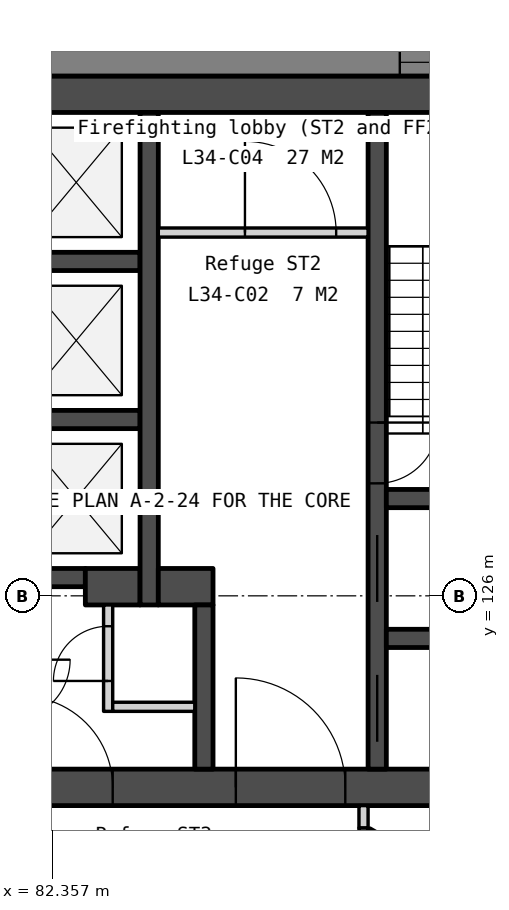
"""IFC4 building model, lengths in metres.
Left out: names, types, materials, properties, quantities, classifications, styles, units other than length and angle.
Written with IfcOpenShell. Run it as: python <this file> out.ifc"""

import sys

from ifc_helpers import new_model, si_unit, direction, frame, frame_2d, origin, place, context, subcontext, project, spatial, polyline, rectangle, outline, extrude, element, fill, save


model = new_model("IFC4")
c1 = context("Model", 3, precision=1e-05, world=origin(), true_north=direction((0.0, 1.0)))
c2 = subcontext(c1, "Body", "Model", "MODEL_VIEW")
j1 = project(units=[si_unit("LENGTHUNIT", "METRE"), si_unit("PLANEANGLEUNIT", "RADIAN")], contexts=[c1])
p1 = place(None, origin())
s1 = spatial("IfcSite", under=j1, at=p1, CompositionType="ELEMENT")
p2 = place(p1, origin())
s2 = spatial("IfcBuilding", under=s1, at=p2, CompositionType="ELEMENT")
p3 = place(p2, frame((0.0, 0.0, 136.4)))
s3 = spatial("IfcBuildingStorey", under=s2, at=p3, CompositionType="ELEMENT", Elevation=136.4)
p4 = place(p3, frame((69.0, 134.25, 0.0), z_axis=(0.0, 0.0, 1.0), x_axis=(1.0, 0.0, 0.0)))
e1 = element("IfcWall", 1, at=p4, inside=s3, PredefinedType="SOLIDWALL", context=c2, shape_type="SweptSolid", body=[
    extrude(rectangle(XDim=22.0, YDim=0.6, at=frame_2d((11.0, 0.0))), origin(), (0.0, 0.0, 1.0), 3.75),
])
p5 = place(p3, frame((69.0, 122.85, 0.0), z_axis=(0.0, 0.0, 1.0), x_axis=(1.0, 0.0, 0.0)))
e2 = element("IfcWall", 2, at=p5, inside=s3, PredefinedType="SOLIDWALL", context=c2, shape_type="SweptSolid", body=[
    extrude(rectangle(XDim=22.0, YDim=0.6, at=frame_2d((11.0, 0.0))), origin(), (0.0, 0.0, 1.0), 3.75),
])
p6 = place(p5, frame((16.375, 0.0, 0.0)))
e3 = element("IfcOpeningElement", 3, at=p6, cuts=e2, PredefinedType="OPENING", context=c2, shape_type="SweptSolid", body=[
    extrude(rectangle(XDim=1.8, YDim=2.1, at=frame_2d((0.9, 1.05))), frame((0.0, 0.31, 0.0), z_axis=(0.0, -1.0, 0.0), x_axis=(1.0, 0.0, 0.0)), (0.0, 0.0, 1.0), 0.62),
])
p7 = place(p5, frame((3.825, 0.0, 0.0)))
e4 = element("IfcOpeningElement", 4, at=p7, cuts=e2, PredefinedType="OPENING", context=c2, shape_type="SweptSolid", body=[
    extrude(rectangle(XDim=1.8, YDim=2.1, at=frame_2d((0.9, 1.05))), frame((0.0, 0.31, 0.0), z_axis=(0.0, -1.0, 0.0), x_axis=(1.0, 0.0, 0.0)), (0.0, 0.0, 1.0), 0.62),
])
p8 = place(p5, frame((12.85, 0.0, 0.0)))
e5 = element("IfcOpeningElement", 5, at=p8, cuts=e2, PredefinedType="OPENING", context=c2, shape_type="SweptSolid", body=[
    extrude(rectangle(XDim=1.5, YDim=2.1, at=frame_2d((0.75, 1.05))), frame((0.0, 0.31, 0.0), z_axis=(0.0, -1.0, 0.0), x_axis=(1.0, 0.0, 0.0)), (0.0, 0.0, 1.0), 0.62),
])
for number, where, z_axis, x_axis in (
    (6, (81.7, 131.5, 0.0), (0.0, 0.0, 1.0), (1.0, 0.0, 0.0)),
    (7, (81.7, 128.9, 0.0), (0.0, 0.0, 1.0), (1.0, 0.0, 0.0)),
):
    element("IfcWall", number, at=place(p3, frame(where, z_axis=z_axis, x_axis=x_axis)), inside=s3, PredefinedType="SOLIDWALL", context=c2, shape_type="SweptSolid", body=[
        extrude(rectangle(XDim=2.1, YDim=0.3, at=frame_2d((1.05, 0.0))), origin(), (0.0, 0.0, 1.0), 3.75),
    ])
p9 = place(p3, frame((81.7, 126.3, 0.0), z_axis=(0.0, 0.0, 1.0), x_axis=(1.0, 0.0, 0.0)))
e8 = element("IfcWall", 8, at=p9, inside=s3, PredefinedType="SOLIDWALL", context=c2, shape_type="SweptSolid", body=[
    extrude(rectangle(XDim=1.2, YDim=0.3, at=frame_2d((0.6, 0.0))), origin(), (0.0, 0.0, 1.0), 3.75),
])
p10 = place(p3, frame((82.9, 126.15, 0.0), z_axis=(0.0, 0.0, 1.0), x_axis=(1.0, 0.0, 0.0)))
e9 = element("IfcWall", 9, at=p10, inside=s3, PredefinedType="SOLIDWALL", context=c2, shape_type="SweptSolid", body=[
    extrude(rectangle(XDim=0.9, YDim=0.6, at=frame_2d((0.45, 0.0))), origin(), (0.0, 0.0, 1.0), 3.75),
])
p11 = place(p3, frame((83.275, 125.85, 0.0), z_axis=(0.0, 0.0, 1.0), x_axis=(0.0, -1.0, 0.0)))
e10 = element("IfcWall", 10, at=p11, inside=s3, PredefinedType="PARTITIONING", context=c2, shape_type="SweptSolid", body=[
    extrude(rectangle(XDim=1.75, YDim=0.15, at=frame_2d((0.875, 0.0))), origin(), (0.0, 0.0, 1.0), 3.75),
])
p12 = place(p11, frame((0.35, 0.0, 0.0)))
e11 = element("IfcOpeningElement", 11, at=p12, cuts=e10, PredefinedType="OPENING", context=c2, shape_type="SweptSolid", body=[
    extrude(rectangle(XDim=0.9, YDim=2.1, at=frame_2d((0.45, 1.05))), frame((0.0, 0.085, 0.0), z_axis=(0.0, -1.0, 0.0), x_axis=(1.0, 0.0, 0.0)), (0.0, 0.0, 1.0), 0.17),
])
p13 = place(p3, frame((83.35, 124.175, 0.0), z_axis=(0.0, 0.0, 1.0), x_axis=(1.0, 0.0, 0.0)))
e12 = element("IfcWall", 12, at=p13, inside=s3, PredefinedType="PARTITIONING", context=c2, shape_type="SweptSolid", body=[
    extrude(rectangle(XDim=1.35, YDim=0.15, at=frame_2d((0.675, 0.0))), origin(), (0.0, 0.0, 1.0), 3.75),
])
p14 = place(p3, frame((83.95, 133.95, 0.0), z_axis=(0.0, 0.0, 1.0), x_axis=(0.0, -1.0, 0.0)))
e13 = element("IfcWall", 13, at=p14, inside=s3, PredefinedType="SOLIDWALL", context=c2, shape_type="SweptSolid", body=[
    extrude(rectangle(XDim=8.1, YDim=0.3, at=frame_2d((4.05, 0.0))), origin(), (0.0, 0.0, 1.0), 3.75),
])
p15 = place(p3, frame((84.1, 131.975, 0.0), z_axis=(0.0, 0.0, 1.0), x_axis=(1.0, 0.0, 0.0)))
e14 = element("IfcWall", 14, at=p15, inside=s3, PredefinedType="PARTITIONING", context=c2, shape_type="SweptSolid", body=[
    extrude(rectangle(XDim=3.45, YDim=0.15, at=frame_2d((1.725, 0.0))), origin(), (0.0, 0.0, 1.0), 3.75),
])
p16 = place(p15, frame((1.425, 0.0, 0.0)))
e15 = element("IfcOpeningElement", 15, at=p16, cuts=e14, PredefinedType="OPENING", context=c2, shape_type="SweptSolid", body=[
    extrude(rectangle(XDim=1.5, YDim=2.1, at=frame_2d((0.75, 1.05))), frame((0.0, 0.085, 0.0), z_axis=(0.0, -1.0, 0.0), x_axis=(1.0, 0.0, 0.0)), (0.0, 0.0, 1.0), 0.17),
])
p17 = place(p3, frame((84.1, 126.15, 0.0), z_axis=(0.0, 0.0, 1.0), x_axis=(1.0, 0.0, 0.0)))
e16 = element("IfcWall", 16, at=p17, inside=s3, PredefinedType="SOLIDWALL", context=c2, shape_type="SweptSolid", body=[
    extrude(rectangle(XDim=0.9, YDim=0.6, at=frame_2d((0.45, 0.0))), origin(), (0.0, 0.0, 1.0), 3.75),
])
p18 = place(p3, frame((84.85, 125.85, 0.0), z_axis=(0.0, 0.0, 1.0), x_axis=(0.0, -1.0, 0.0)))
e17 = element("IfcWall", 17, at=p18, inside=s3, PredefinedType="SOLIDWALL", context=c2, shape_type="SweptSolid", body=[
    extrude(rectangle(XDim=2.7, YDim=0.3, at=frame_2d((1.35, 0.0))), origin(), (0.0, 0.0, 1.0), 3.75),
])
p19 = place(p3, frame((87.7, 133.95, 0.0), z_axis=(0.0, 0.0, 1.0), x_axis=(0.0, -1.0, 0.0)))
e18 = element("IfcWall", 18, at=p19, inside=s3, PredefinedType="SOLIDWALL", context=c2, shape_type="SweptSolid", body=[
    extrude(rectangle(XDim=10.8, YDim=0.3, at=frame_2d((5.4, 0.0))), origin(), (0.0, 0.0, 1.0), 3.75),
])
p20 = place(p19, frame((6.95, 0.0, 0.0)))
e19 = element("IfcOpeningElement", 19, at=p20, cuts=e18, PredefinedType="OPENING", context=c2, shape_type="SweptSolid", body=[
    extrude(rectangle(XDim=1.1, YDim=2.1, at=frame_2d((0.55, 1.05))), frame((0.0, 0.16, 0.0), z_axis=(0.0, -1.0, 0.0), x_axis=(1.0, 0.0, 0.0)), (0.0, 0.0, 1.0), 0.32),
])
p21 = place(p19, frame((5.1, 0.0, 0.0)))
e20 = element("IfcOpeningElement", 20, at=p21, cuts=e18, PredefinedType="OPENING", context=c2, shape_type="SweptSolid", body=[
    extrude(rectangle(XDim=1.0, YDim=2.1, at=frame_2d((0.5, 1.05))), frame((0.0, 0.16, 0.0), z_axis=(0.0, -1.0, 0.0), x_axis=(1.0, 0.0, 0.0)), (0.0, 0.0, 1.0), 0.32),
])
p22 = place(p19, frame((9.25, 0.0, 0.0)))
e21 = element("IfcOpeningElement", 21, at=p22, cuts=e18, PredefinedType="OPENING", context=c2, shape_type="SweptSolid", body=[
    extrude(rectangle(XDim=1.1, YDim=2.1, at=frame_2d((0.55, 1.05))), frame((0.0, 0.16, 0.0), z_axis=(0.0, -1.0, 0.0), x_axis=(1.0, 0.0, 0.0)), (0.0, 0.0, 1.0), 0.32),
])
for number, where, z_axis, x_axis in (
    (22, (87.85, 127.6, 0.0), (0.0, 0.0, 1.0), (1.0, 0.0, 0.0)),
    (23, (87.85, 125.3, 0.0), (0.0, 0.0, 1.0), (1.0, 0.0, 0.0)),
):
    element("IfcWall", number, at=place(p3, frame(where, z_axis=z_axis, x_axis=x_axis)), inside=s3, PredefinedType="SOLIDWALL", context=c2, shape_type="SweptSolid", body=[
        extrude(rectangle(XDim=2.55, YDim=0.3, at=frame_2d((1.275, 0.0))), origin(), (0.0, 0.0, 1.0), 3.75),
    ])
p23 = place(p3, frame((100.243, 134.775, -0.15), z_axis=(0.0, 0.0, 1.0), x_axis=(-1.0, 0.0, 0.0)))
e24 = element("IfcWall", 24, at=p23, inside=s3, PredefinedType="SOLIDWALL", context=c2, shape_type="SweptSolid", body=[
    extrude(outline(polyline([(40.486, 0.0), (40.486, 3.9), (0.0, 3.9), (0.0, 0.0), (40.486, 0.0)])), frame((0.0, 0.225, 0.0), z_axis=(0.0, -1.0, 0.0), x_axis=(1.0, 0.0, 0.0)), (0.0, 0.0, 1.0), 0.45),
])
p24 = place(p23, frame((0.87, 0.0, 0.95)))
e25 = element("IfcOpeningElement", 25, at=p24, cuts=e24, PredefinedType="OPENING", context=c2, shape_type="SweptSolid", body=[
    extrude(rectangle(XDim=1.2, YDim=2.2, at=frame_2d((0.6, 1.1))), frame((0.0, 0.235, 0.0), z_axis=(0.0, -1.0, 0.0), x_axis=(1.0, 0.0, 0.0)), (0.0, 0.0, 1.0), 0.47),
])
p25 = place(p23, frame((8.072, 0.0, 0.95)))
e26 = element("IfcOpeningElement", 26, at=p25, cuts=e24, PredefinedType="OPENING", context=c2, shape_type="SweptSolid", body=[
    extrude(rectangle(XDim=1.8, YDim=2.2, at=frame_2d((0.9, 1.1))), frame((0.0, 0.235, 0.0), z_axis=(0.0, -1.0, 0.0), x_axis=(1.0, 0.0, 0.0)), (0.0, 0.0, 1.0), 0.47),
])
p26 = place(p23, frame((10.372, 0.0, 0.95)))
e27 = element("IfcOpeningElement", 27, at=p26, cuts=e24, PredefinedType="OPENING", context=c2, shape_type="SweptSolid", body=[
    extrude(rectangle(XDim=1.8, YDim=2.2, at=frame_2d((0.9, 1.1))), frame((0.0, 0.235, 0.0), z_axis=(0.0, -1.0, 0.0), x_axis=(1.0, 0.0, 0.0)), (0.0, 0.0, 1.0), 0.47),
])
p27 = place(p23, frame((18.193, 0.0, 0.95)))
e28 = element("IfcOpeningElement", 28, at=p27, cuts=e24, PredefinedType="OPENING", context=c2, shape_type="SweptSolid", body=[
    extrude(rectangle(XDim=1.8, YDim=2.2, at=frame_2d((0.9, 1.1))), frame((0.0, 0.235, 0.0), z_axis=(0.0, -1.0, 0.0), x_axis=(1.0, 0.0, 0.0)), (0.0, 0.0, 1.0), 0.47),
])
p28 = place(p23, frame((20.493, 0.0, 0.95)))
e29 = element("IfcOpeningElement", 29, at=p28, cuts=e24, PredefinedType="OPENING", context=c2, shape_type="SweptSolid", body=[
    extrude(rectangle(XDim=1.8, YDim=2.2, at=frame_2d((0.9, 1.1))), frame((0.0, 0.235, 0.0), z_axis=(0.0, -1.0, 0.0), x_axis=(1.0, 0.0, 0.0)), (0.0, 0.0, 1.0), 0.47),
])
p29 = place(p23, frame((28.315, 0.0, 0.95)))
e30 = element("IfcOpeningElement", 30, at=p29, cuts=e24, PredefinedType="OPENING", context=c2, shape_type="SweptSolid", body=[
    extrude(rectangle(XDim=1.8, YDim=2.2, at=frame_2d((0.9, 1.1))), frame((0.0, 0.235, 0.0), z_axis=(0.0, -1.0, 0.0), x_axis=(1.0, 0.0, 0.0)), (0.0, 0.0, 1.0), 0.47),
])
p30 = place(p23, frame((30.615, 0.0, 0.95)))
e31 = element("IfcOpeningElement", 31, at=p30, cuts=e24, PredefinedType="OPENING", context=c2, shape_type="SweptSolid", body=[
    extrude(rectangle(XDim=1.8, YDim=2.2, at=frame_2d((0.9, 1.1))), frame((0.0, 0.235, 0.0), z_axis=(0.0, -1.0, 0.0), x_axis=(1.0, 0.0, 0.0)), (0.0, 0.0, 1.0), 0.47),
])
p31 = place(p23, frame((38.417, 0.0, 0.95)))
e32 = element("IfcOpeningElement", 32, at=p31, cuts=e24, PredefinedType="OPENING", context=c2, shape_type="SweptSolid", body=[
    extrude(rectangle(XDim=1.2, YDim=2.2, at=frame_2d((0.6, 1.1))), frame((0.0, 0.235, 0.0), z_axis=(0.0, -1.0, 0.0), x_axis=(1.0, 0.0, 0.0)), (0.0, 0.0, 1.0), 0.47),
])
p32 = place(p3, frame((82.105, 96.067, -0.15), z_axis=(0.0, 0.0, 1.0), x_axis=(0.499997369791, 0.866026922331, 0.0)))
e33 = element("IfcWall", 33, at=p32, inside=s3, PredefinedType="SOLIDWALL", context=c2, shape_type="SweptSolid", body=[
    extrude(outline(polyline([(40.486, 0.0), (40.486, 3.9), (0.0, 3.9), (0.0, 0.0), (40.486, 0.0)])), frame((0.0, 0.225, 0.0), z_axis=(0.0, -1.0, 0.0), x_axis=(1.0, 0.0, 0.0)), (0.0, 0.0, 1.0), 0.45),
])
p33 = place(p32, frame((0.87, 0.0, 0.95)))
e34 = element("IfcOpeningElement", 34, at=p33, cuts=e33, PredefinedType="OPENING", context=c2, shape_type="SweptSolid", body=[
    extrude(rectangle(XDim=1.2, YDim=2.2, at=frame_2d((0.6, 1.1))), frame((0.0, 0.235, 0.0), z_axis=(0.0, -1.0, 0.0), x_axis=(1.0, 0.0, 0.0)), (0.0, 0.0, 1.0), 0.47),
])
p34 = place(p32, frame((8.072, 0.0, 0.95)))
e35 = element("IfcOpeningElement", 35, at=p34, cuts=e33, PredefinedType="OPENING", context=c2, shape_type="SweptSolid", body=[
    extrude(rectangle(XDim=1.8, YDim=2.2, at=frame_2d((0.9, 1.1))), frame((0.0, 0.235, 0.0), z_axis=(0.0, -1.0, 0.0), x_axis=(1.0, 0.0, 0.0)), (0.0, 0.0, 1.0), 0.47),
])
p35 = place(p32, frame((10.372, 0.0, 0.95)))
e36 = element("IfcOpeningElement", 36, at=p35, cuts=e33, PredefinedType="OPENING", context=c2, shape_type="SweptSolid", body=[
    extrude(rectangle(XDim=1.8, YDim=2.2, at=frame_2d((0.9, 1.1))), frame((0.0, 0.235, 0.0), z_axis=(0.0, -1.0, 0.0), x_axis=(1.0, 0.0, 0.0)), (0.0, 0.0, 1.0), 0.47),
])
p36 = place(p32, frame((18.193, 0.0, 0.95)))
e37 = element("IfcOpeningElement", 37, at=p36, cuts=e33, PredefinedType="OPENING", context=c2, shape_type="SweptSolid", body=[
    extrude(rectangle(XDim=1.8, YDim=2.2, at=frame_2d((0.9, 1.1))), frame((0.0, 0.235, 0.0), z_axis=(0.0, -1.0, 0.0), x_axis=(1.0, 0.0, 0.0)), (0.0, 0.0, 1.0), 0.47),
])
p37 = place(p32, frame((20.493, 0.0, 0.95)))
e38 = element("IfcOpeningElement", 38, at=p37, cuts=e33, PredefinedType="OPENING", context=c2, shape_type="SweptSolid", body=[
    extrude(rectangle(XDim=1.8, YDim=2.2, at=frame_2d((0.9, 1.1))), frame((0.0, 0.235, 0.0), z_axis=(0.0, -1.0, 0.0), x_axis=(1.0, 0.0, 0.0)), (0.0, 0.0, 1.0), 0.47),
])
p38 = place(p32, frame((28.315, 0.0, 0.95)))
e39 = element("IfcOpeningElement", 39, at=p38, cuts=e33, PredefinedType="OPENING", context=c2, shape_type="SweptSolid", body=[
    extrude(rectangle(XDim=1.8, YDim=2.2, at=frame_2d((0.9, 1.1))), frame((0.0, 0.235, 0.0), z_axis=(0.0, -1.0, 0.0), x_axis=(1.0, 0.0, 0.0)), (0.0, 0.0, 1.0), 0.47),
])
p39 = place(p32, frame((30.615, 0.0, 0.95)))
e40 = element("IfcOpeningElement", 40, at=p39, cuts=e33, PredefinedType="OPENING", context=c2, shape_type="SweptSolid", body=[
    extrude(rectangle(XDim=1.8, YDim=2.2, at=frame_2d((0.9, 1.1))), frame((0.0, 0.235, 0.0), z_axis=(0.0, -1.0, 0.0), x_axis=(1.0, 0.0, 0.0)), (0.0, 0.0, 1.0), 0.47),
])
p40 = place(p32, frame((38.417, 0.0, 0.95)))
e41 = element("IfcOpeningElement", 41, at=p40, cuts=e33, PredefinedType="OPENING", context=c2, shape_type="SweptSolid", body=[
    extrude(rectangle(XDim=1.2, YDim=2.2, at=frame_2d((0.6, 1.1))), frame((0.0, 0.235, 0.0), z_axis=(0.0, -1.0, 0.0), x_axis=(1.0, 0.0, 0.0)), (0.0, 0.0, 1.0), 0.47),
])
p41 = place(p3, frame((87.557, 122.137, 0.0), z_axis=(0.0, 0.0, 1.0), x_axis=(0.866029768103, -0.499992440702, 0.0)))
e42 = element("IfcWall", 42, at=p41, inside=s3, PredefinedType="PARTITIONING", context=c2, shape_type="SweptSolid", body=[
    extrude(rectangle(XDim=8.089, YDim=0.1, at=frame_2d((4.044, 0.0))), origin(), (0.0, 0.0, 1.0), 3.75),
])
p42 = place(p41, frame((3.594, 0.0, 0.0)))
e43 = element("IfcOpeningElement", 43, at=p42, cuts=e42, PredefinedType="OPENING", context=c2, shape_type="SweptSolid", body=[
    extrude(rectangle(XDim=0.9, YDim=2.1, at=frame_2d((0.45, 1.05))), frame((0.0, 0.06, 0.0), z_axis=(0.0, -1.0, 0.0), x_axis=(1.0, 0.0, 0.0)), (0.0, 0.0, 1.0), 0.12),
])
p43 = place(p3, frame((87.475, 120.025, 0.0), z_axis=(0.0, 0.0, 1.0), x_axis=(0.0, 1.0, 0.0)))
e44 = element("IfcWall", 44, at=p43, inside=s3, PredefinedType="PARTITIONING", context=c2, shape_type="SweptSolid", body=[
    extrude(rectangle(XDim=2.16, YDim=0.15, at=frame_2d((1.08, 0.0))), origin(), (0.0, 0.0, 1.0), 3.75),
])
p44 = place(p43, frame((0.58, 0.0, 0.0)))
e45 = element("IfcOpeningElement", 45, at=p44, cuts=e44, PredefinedType="OPENING", context=c2, shape_type="SweptSolid", body=[
    extrude(rectangle(XDim=1.0, YDim=2.1, at=frame_2d((0.5, 1.05))), frame((0.0, 0.085, 0.0), z_axis=(0.0, -1.0, 0.0), x_axis=(1.0, 0.0, 0.0)), (0.0, 0.0, 1.0), 0.17),
])
p45 = place(p3, frame((87.475, 122.185, 0.0), z_axis=(0.0, 0.0, 1.0), x_axis=(0.0, 1.0, 0.0)))
e46 = element("IfcWall", 46, at=p45, inside=s3, PredefinedType="PARTITIONING", context=c2, shape_type="SweptSolid", body=[
    extrude(rectangle(XDim=0.365, YDim=0.15, at=frame_2d((0.183, 0.0))), origin(), (0.0, 0.0, 1.0), 3.75),
])
p46 = place(p20, origin())
e47 = element("IfcDoor", 47, at=p46, inside=s3, OperationType="SLIDING_TO_LEFT", PredefinedType="DOOR", context=c2, shape_type="SweptSolid", body=[
    extrude(rectangle(XDim=1.1, YDim=2.1, at=frame_2d((0.55, 1.05))), frame((0.0, 0.025, 0.0), z_axis=(0.0, -1.0, 0.0), x_axis=(1.0, 0.0, 0.0)), (0.0, 0.0, 1.0), 0.05),
])
fill(e19, e47)
p47 = place(p6, origin())
e48 = element("IfcDoor", 48, at=p47, inside=s3, OperationType="DOUBLE_DOOR_DOUBLE_SWING", PredefinedType="DOOR", context=c2, shape_type="SweptSolid", body=[
    extrude(rectangle(XDim=1.8, YDim=2.1, at=frame_2d((0.9, 1.05))), frame((0.0, 0.025, 0.0), z_axis=(0.0, -1.0, 0.0), x_axis=(1.0, 0.0, 0.0)), (0.0, 0.0, 1.0), 0.05),
])
fill(e3, e48)
p48 = place(p8, origin())
e49 = element("IfcDoor", 49, at=p48, inside=s3, OperationType="DOUBLE_DOOR_DOUBLE_SWING", PredefinedType="DOOR", context=c2, shape_type="SweptSolid", body=[
    extrude(rectangle(XDim=1.5, YDim=2.1, at=frame_2d((0.75, 1.05))), frame((0.0, 0.025, 0.0), z_axis=(0.0, -1.0, 0.0), x_axis=(1.0, 0.0, 0.0)), (0.0, 0.0, 1.0), 0.05),
])
fill(e5, e49)
p49 = place(p12, origin())
e50 = element("IfcDoor", 50, at=p49, inside=s3, OperationType="SINGLE_SWING_RIGHT", PredefinedType="DOOR", context=c2, shape_type="SweptSolid", body=[
    extrude(rectangle(XDim=0.9, YDim=2.1, at=frame_2d((0.45, 1.05))), frame((0.0, 0.025, 0.0), z_axis=(0.0, -1.0, 0.0), x_axis=(1.0, 0.0, 0.0)), (0.0, 0.0, 1.0), 0.05),
])
fill(e11, e50)
p50 = place(p16, origin())
e51 = element("IfcDoor", 51, at=p50, inside=s3, OperationType="DOUBLE_DOOR_DOUBLE_SWING", PredefinedType="DOOR", context=c2, shape_type="SweptSolid", body=[
    extrude(rectangle(XDim=1.5, YDim=2.1, at=frame_2d((0.75, 1.05))), frame((0.0, 0.025, 0.0), z_axis=(0.0, -1.0, 0.0), x_axis=(1.0, 0.0, 0.0)), (0.0, 0.0, 1.0), 0.05),
])
fill(e15, e51)
p51 = place(p21, origin())
e52 = element("IfcDoor", 52, at=p51, inside=s3, OperationType="SINGLE_SWING_LEFT", PredefinedType="DOOR", context=c2, shape_type="SweptSolid", body=[
    extrude(rectangle(XDim=1.0, YDim=2.1, at=frame_2d((0.5, 1.05))), frame((0.0, 0.025, 0.0), z_axis=(0.0, -1.0, 0.0), x_axis=(1.0, 0.0, 0.0)), (0.0, 0.0, 1.0), 0.05),
])
fill(e20, e52)
p52 = place(p22, origin())
e53 = element("IfcDoor", 53, at=p52, inside=s3, OperationType="SLIDING_TO_LEFT", PredefinedType="DOOR", context=c2, shape_type="SweptSolid", body=[
    extrude(rectangle(XDim=1.1, YDim=2.1, at=frame_2d((0.55, 1.05))), frame((0.0, 0.025, 0.0), z_axis=(0.0, -1.0, 0.0), x_axis=(1.0, 0.0, 0.0)), (0.0, 0.0, 1.0), 0.05),
])
fill(e21, e53)
p53 = place(p26, origin())
e54 = element("IfcWindow", 54, at=p53, inside=s3, PartitioningType="SINGLE_PANEL", PredefinedType="WINDOW", context=c2, shape_type="SweptSolid", body=[
    extrude(rectangle(XDim=1.8, YDim=2.2, at=frame_2d((0.9, 1.1))), frame((0.0, 0.03, 0.0), z_axis=(0.0, -1.0, 0.0), x_axis=(1.0, 0.0, 0.0)), (0.0, 0.0, 1.0), 0.06),
])
fill(e27, e54)
save(model, sys.argv[1])
